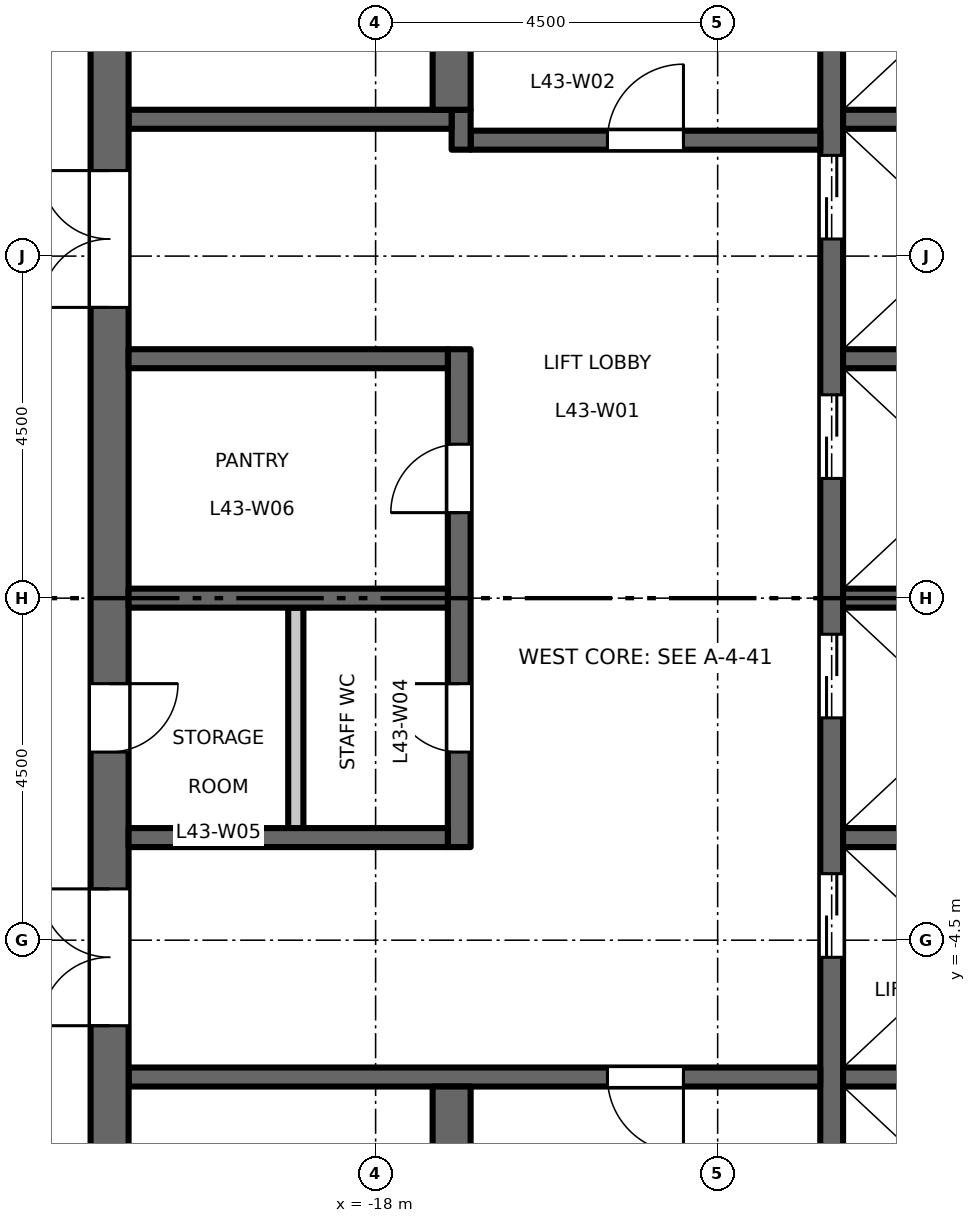
"""IFC4 building model, lengths in metres.
Left out: names, types, materials, properties, quantities, classifications, styles, units other than length and angle.
Written with IfcOpenShell. Run it as: python <this file> out.ifc"""

import sys

from ifc_helpers import new_model, si_unit, direction, frame, frame_2d, origin, place, context, subcontext, project, spatial, rectangle, extrude, element, fill, save


model = new_model("IFC4")
c1 = context("Model", 3, precision=1e-05, world=origin(), true_north=direction((0.0, 1.0)))
c2 = subcontext(c1, "Body", "Model", "MODEL_VIEW")
j1 = project(units=[si_unit("LENGTHUNIT", "METRE"), si_unit("PLANEANGLEUNIT", "RADIAN")], contexts=[c1])
p1 = place(None, origin())
s1 = spatial("IfcSite", under=j1, at=p1, CompositionType="ELEMENT")
p2 = place(p1, origin())
s2 = spatial("IfcBuilding", under=s1, at=p2, CompositionType="ELEMENT")
p3 = place(p2, frame((0.0, 0.0, 201.7)))
s3 = spatial("IfcBuildingStorey", under=s2, at=p3, CompositionType="ELEMENT", Elevation=201.7)
p4 = place(p3, frame((-12.0, -9.45, 0.0), z_axis=(0.0, 0.0, 1.0), x_axis=(0.0, 1.0, 0.0)))
e1 = element("IfcWall", 1, at=p4, inside=s3, PredefinedType="SHEAR", context=c2, shape_type="SweptSolid", body=[
    extrude(rectangle(XDim=18.9, YDim=0.3, at=frame_2d((9.45, 0.0))), origin(), (0.0, 0.0, 1.0), 4.35),
])
p5 = place(p4, frame((4.725, 0.0, 0.0)))
e2 = element("IfcOpeningElement", 2, at=p5, cuts=e1, PredefinedType="OPENING", context=c2, shape_type="SweptSolid", body=[
    extrude(rectangle(XDim=1.1, YDim=2.1, at=frame_2d((0.55, 1.05))), frame((0.0, 0.16, 0.0), z_axis=(0.0, -1.0, 0.0), x_axis=(1.0, 0.0, 0.0)), (0.0, 0.0, 1.0), 0.32),
])
p6 = place(p4, frame((7.875, 0.0, 0.0)))
e3 = element("IfcOpeningElement", 3, at=p6, cuts=e1, PredefinedType="OPENING", context=c2, shape_type="SweptSolid", body=[
    extrude(rectangle(XDim=1.1, YDim=2.1, at=frame_2d((0.55, 1.05))), frame((0.0, 0.16, 0.0), z_axis=(0.0, -1.0, 0.0), x_axis=(1.0, 0.0, 0.0)), (0.0, 0.0, 1.0), 0.32),
])
p7 = place(p4, frame((11.025, 0.0, 0.0)))
e4 = element("IfcOpeningElement", 4, at=p7, cuts=e1, PredefinedType="OPENING", context=c2, shape_type="SweptSolid", body=[
    extrude(rectangle(XDim=1.1, YDim=2.1, at=frame_2d((0.55, 1.05))), frame((0.0, 0.16, 0.0), z_axis=(0.0, -1.0, 0.0), x_axis=(1.0, 0.0, 0.0)), (0.0, 0.0, 1.0), 0.32),
])
p8 = place(p4, frame((14.175, 0.0, 0.0)))
e5 = element("IfcOpeningElement", 5, at=p8, cuts=e1, PredefinedType="OPENING", context=c2, shape_type="SweptSolid", body=[
    extrude(rectangle(XDim=1.1, YDim=2.1, at=frame_2d((0.55, 1.05))), frame((0.0, 0.16, 0.0), z_axis=(0.0, -1.0, 0.0), x_axis=(1.0, 0.0, 0.0)), (0.0, 0.0, 1.0), 0.32),
])
p9 = place(p4, frame((16.725, 0.0, 0.0)))
e6 = element("IfcOpeningElement", 6, at=p9, cuts=e1, PredefinedType="OPENING", context=c2, shape_type="SweptSolid", body=[
    extrude(rectangle(XDim=1.2, YDim=2.1, at=frame_2d((0.6, 1.05))), frame((0.0, 0.16, 0.0), z_axis=(0.0, -1.0, 0.0), x_axis=(1.0, 0.0, 0.0)), (0.0, 0.0, 1.0), 0.32),
])
p10 = place(p4, frame((0.975, 0.0, 0.0)))
e7 = element("IfcOpeningElement", 7, at=p10, cuts=e1, PredefinedType="OPENING", context=c2, shape_type="SweptSolid", body=[
    extrude(rectangle(XDim=1.2, YDim=2.1, at=frame_2d((0.6, 1.05))), frame((0.0, 0.16, 0.0), z_axis=(0.0, -1.0, 0.0), x_axis=(1.0, 0.0, 0.0)), (0.0, 0.0, 1.0), 0.32),
])
p11 = place(p3, frame((-12.15, 6.025, 0.0), z_axis=(0.0, 0.0, 1.0), x_axis=(-1.0, 0.0, 0.0)))
e8 = element("IfcWall", 8, at=p11, inside=s3, PredefinedType="SHEAR", context=c2, shape_type="SweptSolid", body=[
    extrude(rectangle(XDim=4.6, YDim=0.25, at=frame_2d((2.3, 0.0))), origin(), (0.0, 0.0, 1.0), 4.35),
])
p12 = place(p11, frame((1.8, 0.0, 0.0)))
e9 = element("IfcOpeningElement", 9, at=p12, cuts=e8, PredefinedType="OPENING", context=c2, shape_type="SweptSolid", body=[
    extrude(rectangle(XDim=1.0, YDim=2.1, at=frame_2d((0.5, 1.05))), frame((0.0, 0.135, 0.0), z_axis=(0.0, -1.0, 0.0), x_axis=(1.0, 0.0, 0.0)), (0.0, 0.0, 1.0), 0.27),
])
p13 = place(p3, frame((-16.875, 5.9, 0.0), z_axis=(0.0, 0.0, 1.0), x_axis=(0.0, 1.0, 0.0)))
e10 = element("IfcWall", 10, at=p13, inside=s3, PredefinedType="SHEAR", context=c2, shape_type="SweptSolid", body=[
    extrude(rectangle(XDim=0.525, YDim=0.25, at=frame_2d((0.263, 0.0))), origin(), (0.0, 0.0, 1.0), 4.35),
])
p14 = place(p3, frame((-17.0, 6.3, 0.0), z_axis=(0.0, 0.0, 1.0), x_axis=(-1.0, 0.0, 0.0)))
e11 = element("IfcWall", 11, at=p14, inside=s3, PredefinedType="SHEAR", context=c2, shape_type="SweptSolid", body=[
    extrude(rectangle(XDim=4.25, YDim=0.25, at=frame_2d((2.125, 0.0))), origin(), (0.0, 0.0, 1.0), 4.35),
])
p15 = place(p3, frame((-12.15, -6.3, 0.0), z_axis=(0.0, 0.0, 1.0), x_axis=(-1.0, 0.0, 0.0)))
e12 = element("IfcWall", 12, at=p15, inside=s3, PredefinedType="SHEAR", context=c2, shape_type="SweptSolid", body=[
    extrude(rectangle(XDim=9.1, YDim=0.25, at=frame_2d((4.55, 0.0))), origin(), (0.0, 0.0, 1.0), 4.35),
])
p16 = place(p15, frame((1.8, 0.0, 0.0)))
e13 = element("IfcOpeningElement", 13, at=p16, cuts=e12, PredefinedType="OPENING", context=c2, shape_type="SweptSolid", body=[
    extrude(rectangle(XDim=1.0, YDim=2.1, at=frame_2d((0.5, 1.05))), frame((0.0, 0.135, 0.0), z_axis=(0.0, -1.0, 0.0), x_axis=(1.0, 0.0, 0.0)), (0.0, 0.0, 1.0), 0.27),
])
p17 = place(p3, frame((-21.5, -13.0, 0.0), z_axis=(0.0, 0.0, 1.0), x_axis=(0.0, 1.0, 0.0)))
e14 = element("IfcWall", 14, at=p17, inside=s3, PredefinedType="SHEAR", context=c2, shape_type="SweptSolid", body=[
    extrude(rectangle(XDim=26.0, YDim=0.5, at=frame_2d((13.0, 0.0))), origin(), (0.0, 0.0, 1.0), 4.35),
])
p18 = place(p17, frame((16.825, 0.0, 0.0)))
e15 = element("IfcOpeningElement", 15, at=p18, cuts=e14, PredefinedType="OPENING", context=c2, shape_type="SweptSolid", body=[
    extrude(rectangle(XDim=1.8, YDim=2.1, at=frame_2d((0.9, 1.05))), frame((0.0, 0.26, 0.0), z_axis=(0.0, -1.0, 0.0), x_axis=(1.0, 0.0, 0.0)), (0.0, 0.0, 1.0), 0.52),
])
p19 = place(p17, frame((7.375, 0.0, 0.0)))
e16 = element("IfcOpeningElement", 16, at=p19, cuts=e14, PredefinedType="OPENING", context=c2, shape_type="SweptSolid", body=[
    extrude(rectangle(XDim=1.8, YDim=2.1, at=frame_2d((0.9, 1.05))), frame((0.0, 0.26, 0.0), z_axis=(0.0, -1.0, 0.0), x_axis=(1.0, 0.0, 0.0)), (0.0, 0.0, 1.0), 0.52),
])
p20 = place(p17, frame((10.975, 0.0, 0.0)))
e17 = element("IfcOpeningElement", 17, at=p20, cuts=e14, PredefinedType="OPENING", context=c2, shape_type="SweptSolid", body=[
    extrude(rectangle(XDim=0.9, YDim=2.1, at=frame_2d((0.45, 1.05))), frame((0.0, 0.26, 0.0), z_axis=(0.0, -1.0, 0.0), x_axis=(1.0, 0.0, 0.0)), (0.0, 0.0, 1.0), 0.52),
])
p21 = place(p3, frame((-16.9, -3.275, 0.0), z_axis=(0.0, 0.0, 1.0), x_axis=(0.0, 1.0, 0.0)))
e18 = element("IfcWall", 18, at=p21, inside=s3, PredefinedType="SHEAR", context=c2, shape_type="SweptSolid", body=[
    extrude(rectangle(XDim=6.55, YDim=0.3, at=frame_2d((3.275, 0.0))), origin(), (0.0, 0.0, 1.0), 4.35),
])
p22 = place(p21, frame((1.25, 0.0, 0.0)))
e19 = element("IfcOpeningElement", 19, at=p22, cuts=e18, PredefinedType="OPENING", context=c2, shape_type="SweptSolid", body=[
    extrude(rectangle(XDim=0.9, YDim=2.1, at=frame_2d((0.45, 1.05))), frame((0.0, 0.16, 0.0), z_axis=(0.0, -1.0, 0.0), x_axis=(1.0, 0.0, 0.0)), (0.0, 0.0, 1.0), 0.32),
])
p23 = place(p21, frame((4.4, 0.0, 0.0)))
e20 = element("IfcOpeningElement", 20, at=p23, cuts=e18, PredefinedType="OPENING", context=c2, shape_type="SweptSolid", body=[
    extrude(rectangle(XDim=0.9, YDim=2.1, at=frame_2d((0.45, 1.05))), frame((0.0, 0.16, 0.0), z_axis=(0.0, -1.0, 0.0), x_axis=(1.0, 0.0, 0.0)), (0.0, 0.0, 1.0), 0.32),
])
for number, where, z_axis, x_axis in (
    (21, (-17.05, 0.0, 0.0), (0.0, 0.0, 1.0), (-1.0, 0.0, 0.0)),
    (22, (-17.05, 3.15, 0.0), (0.0, 0.0, 1.0), (-1.0, 0.0, 0.0)),
    (23, (-17.05, -3.15, 0.0), (0.0, 0.0, 1.0), (-1.0, 0.0, 0.0)),
):
    element("IfcWall", number, at=place(p3, frame(where, z_axis=z_axis, x_axis=x_axis)), inside=s3, PredefinedType="SHEAR", context=c2, shape_type="SweptSolid", body=[
        extrude(rectangle(XDim=4.2, YDim=0.25, at=frame_2d((2.1, 0.0))), origin(), (0.0, 0.0, 1.0), 4.35),
    ])
p24 = place(p3, frame((-19.05, -3.025, 0.0), z_axis=(0.0, 0.0, 1.0), x_axis=(0.0, 1.0, 0.0)))
e24 = element("IfcWall", 24, at=p24, inside=s3, PredefinedType="PARTITIONING", context=c2, shape_type="SweptSolid", body=[
    extrude(rectangle(XDim=2.9, YDim=0.2, at=frame_2d((1.45, 0.0))), origin(), (0.0, 0.0, 1.0), 4.35),
])
for number, where, z_axis, x_axis in (
    (25, (-17.0, 6.425, 0.0), (0.0, 0.0, 1.0), (0.0, 1.0, 0.0)),
    (26, (-17.0, -13.0, 0.0), (0.0, 0.0, 1.0), (0.0, 1.0, 0.0)),
):
    element("IfcWall", number, at=place(p3, frame(where, z_axis=z_axis, x_axis=x_axis)), inside=s3, PredefinedType="SHEAR", context=c2, shape_type="SweptSolid", body=[
        extrude(rectangle(XDim=6.575, YDim=0.5, at=frame_2d((3.288, 0.0))), origin(), (0.0, 0.0, 1.0), 4.35),
    ])
for number, where, z_axis, x_axis in (
    (27, (-8.75, 0.0, 0.0), (0.0, 0.0, 1.0), (-1.0, 0.0, 0.0)),
    (28, (-8.75, 3.15, 0.0), (0.0, 0.0, 1.0), (-1.0, 0.0, 0.0)),
    (29, (-8.75, 6.3, 0.0), (0.0, 0.0, 1.0), (-1.0, 0.0, 0.0)),
    (30, (-8.75, -3.15, 0.0), (0.0, 0.0, 1.0), (-1.0, 0.0, 0.0)),
    (31, (-8.75, -6.3, 0.0), (0.0, 0.0, 1.0), (-1.0, 0.0, 0.0)),
):
    element("IfcWall", number, at=place(p3, frame(where, z_axis=z_axis, x_axis=x_axis)), inside=s3, PredefinedType="SHEAR", context=c2, shape_type="SweptSolid", body=[
        extrude(rectangle(XDim=3.1, YDim=0.25, at=frame_2d((1.55, 0.0))), origin(), (0.0, 0.0, 1.0), 4.35),
    ])
p25 = place(p12, origin())
e32 = element("IfcDoor", 32, at=p25, inside=s3, OperationType="SINGLE_SWING_LEFT", PredefinedType="DOOR", context=c2, shape_type="SweptSolid", body=[
    extrude(rectangle(XDim=1.0, YDim=2.1, at=frame_2d((0.5, 1.05))), frame((0.0, 0.025, 0.0), z_axis=(0.0, -1.0, 0.0), x_axis=(1.0, 0.0, 0.0)), (0.0, 0.0, 1.0), 0.05),
])
fill(e9, e32)
p26 = place(p16, origin())
e33 = element("IfcDoor", 33, at=p26, inside=s3, OperationType="SINGLE_SWING_RIGHT", PredefinedType="DOOR", context=c2, shape_type="SweptSolid", body=[
    extrude(rectangle(XDim=1.0, YDim=2.1, at=frame_2d((0.5, 1.05))), frame((0.0, 0.025, 0.0), z_axis=(0.0, -1.0, 0.0), x_axis=(1.0, 0.0, 0.0)), (0.0, 0.0, 1.0), 0.05),
])
fill(e13, e33)
p27 = place(p18, origin())
e34 = element("IfcDoor", 34, at=p27, inside=s3, OperationType="DOUBLE_DOOR_DOUBLE_SWING", PredefinedType="DOOR", context=c2, shape_type="SweptSolid", body=[
    extrude(rectangle(XDim=1.8, YDim=2.1, at=frame_2d((0.9, 1.05))), frame((0.0, 0.025, 0.0), z_axis=(0.0, -1.0, 0.0), x_axis=(1.0, 0.0, 0.0)), (0.0, 0.0, 1.0), 0.05),
])
fill(e15, e34)
p28 = place(p19, origin())
e35 = element("IfcDoor", 35, at=p28, inside=s3, OperationType="DOUBLE_DOOR_DOUBLE_SWING", PredefinedType="DOOR", context=c2, shape_type="SweptSolid", body=[
    extrude(rectangle(XDim=1.8, YDim=2.1, at=frame_2d((0.9, 1.05))), frame((0.0, 0.025, 0.0), z_axis=(0.0, -1.0, 0.0), x_axis=(1.0, 0.0, 0.0)), (0.0, 0.0, 1.0), 0.05),
])
fill(e16, e35)
p29 = place(p5, origin())
e36 = element("IfcDoor", 36, at=p29, inside=s3, OperationType="DOUBLE_DOOR_SLIDING", PredefinedType="DOOR", context=c2, shape_type="SweptSolid", body=[
    extrude(rectangle(XDim=1.1, YDim=2.1, at=frame_2d((0.55, 1.05))), frame((0.0, 0.025, 0.0), z_axis=(0.0, -1.0, 0.0), x_axis=(1.0, 0.0, 0.0)), (0.0, 0.0, 1.0), 0.05),
])
fill(e2, e36)
p30 = place(p6, origin())
e37 = element("IfcDoor", 37, at=p30, inside=s3, OperationType="DOUBLE_DOOR_SLIDING", PredefinedType="DOOR", context=c2, shape_type="SweptSolid", body=[
    extrude(rectangle(XDim=1.1, YDim=2.1, at=frame_2d((0.55, 1.05))), frame((0.0, 0.025, 0.0), z_axis=(0.0, -1.0, 0.0), x_axis=(1.0, 0.0, 0.0)), (0.0, 0.0, 1.0), 0.05),
])
fill(e3, e37)
p31 = place(p7, origin())
e38 = element("IfcDoor", 38, at=p31, inside=s3, OperationType="DOUBLE_DOOR_SLIDING", PredefinedType="DOOR", context=c2, shape_type="SweptSolid", body=[
    extrude(rectangle(XDim=1.1, YDim=2.1, at=frame_2d((0.55, 1.05))), frame((0.0, 0.025, 0.0), z_axis=(0.0, -1.0, 0.0), x_axis=(1.0, 0.0, 0.0)), (0.0, 0.0, 1.0), 0.05),
])
fill(e4, e38)
p32 = place(p8, origin())
e39 = element("IfcDoor", 39, at=p32, inside=s3, OperationType="DOUBLE_DOOR_SLIDING", PredefinedType="DOOR", context=c2, shape_type="SweptSolid", body=[
    extrude(rectangle(XDim=1.1, YDim=2.1, at=frame_2d((0.55, 1.05))), frame((0.0, 0.025, 0.0), z_axis=(0.0, -1.0, 0.0), x_axis=(1.0, 0.0, 0.0)), (0.0, 0.0, 1.0), 0.05),
])
fill(e5, e39)
p33 = place(p22, origin())
e40 = element("IfcDoor", 40, at=p33, inside=s3, OperationType="SINGLE_SWING_LEFT", PredefinedType="DOOR", context=c2, shape_type="SweptSolid", body=[
    extrude(rectangle(XDim=0.9, YDim=2.1, at=frame_2d((0.45, 1.05))), frame((0.0, 0.025, 0.0), z_axis=(0.0, -1.0, 0.0), x_axis=(1.0, 0.0, 0.0)), (0.0, 0.0, 1.0), 0.05),
])
fill(e19, e40)
p34 = place(p20, origin())
e41 = element("IfcDoor", 41, at=p34, inside=s3, OperationType="SINGLE_SWING_RIGHT", PredefinedType="DOOR", context=c2, shape_type="SweptSolid", body=[
    extrude(rectangle(XDim=0.9, YDim=2.1, at=frame_2d((0.45, 1.05))), frame((0.0, 0.025, 0.0), z_axis=(0.0, -1.0, 0.0), x_axis=(1.0, 0.0, 0.0)), (0.0, 0.0, 1.0), 0.05),
])
fill(e17, e41)
p35 = place(p23, origin())
e42 = element("IfcDoor", 42, at=p35, inside=s3, OperationType="SINGLE_SWING_RIGHT", PredefinedType="DOOR", context=c2, shape_type="SweptSolid", body=[
    extrude(rectangle(XDim=0.9, YDim=2.1, at=frame_2d((0.45, 1.05))), frame((0.0, 0.025, 0.0), z_axis=(0.0, -1.0, 0.0), x_axis=(1.0, 0.0, 0.0)), (0.0, 0.0, 1.0), 0.05),
])
fill(e20, e42)
save(model, sys.argv[1])
